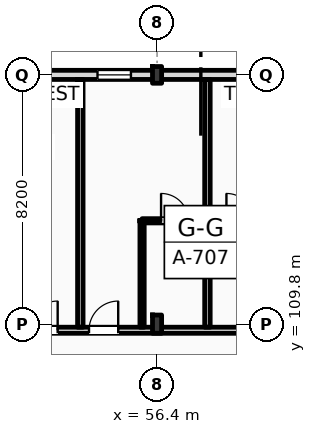
"""IFC4 building model, lengths in metres.
Left out: names, types, materials, properties, quantities, classifications, styles, units other than length and angle.
Written with IfcOpenShell. Run it as: python <this file> out.ifc"""

import sys

from ifc_helpers import new_model, si_unit, direction, frame, frame_2d, origin, origin_2d, place, context, subcontext, project, spatial, rectangle, i_section, extrude, element, fill, save


model = new_model("IFC4")
c1 = context("Model", 3, precision=1e-05, world=origin(), true_north=direction((0.0, 1.0)))
c2 = subcontext(c1, "Body", "Model", "MODEL_VIEW")
j1 = project(units=[si_unit("LENGTHUNIT", "METRE"), si_unit("PLANEANGLEUNIT", "RADIAN")], contexts=[c1])
p1 = place(None, origin())
s1 = spatial("IfcSite", under=j1, at=p1, CompositionType="ELEMENT")
p2 = place(p1, origin())
s2 = spatial("IfcBuilding", under=s1, at=p2, CompositionType="ELEMENT")
p3 = place(p2, frame((0.0, 0.0, 16.2)))
s3 = spatial("IfcBuildingStorey", under=s2, at=p3, CompositionType="ELEMENT", Elevation=16.2)
p4 = place(p3, frame((56.4, 109.8, 0.0), z_axis=(0.0, 0.0, 1.0), x_axis=(1.0, 0.0, 0.0)))
e1 = element("IfcColumn", 1, at=p4, inside=s3, PredefinedType="COLUMN", context=c2, shape_type="SweptSolid", body=[
    extrude(i_section(OverallWidth=0.3, OverallDepth=0.6, WebThickness=0.015, FlangeThickness=0.03, FilletRadius=0.027, at=origin_2d()), origin(), (0.0, 0.0, 1.0), 4.2),
])
p5 = place(p3, frame((56.4, 118.0, 0.0), z_axis=(0.0, 0.0, 1.0), x_axis=(1.0, 0.0, 0.0)))
e2 = element("IfcColumn", 2, at=p5, inside=s3, PredefinedType="COLUMN", context=c2, shape_type="SweptSolid", body=[
    extrude(i_section(OverallWidth=0.3, OverallDepth=0.55, WebThickness=0.015, FlangeThickness=0.029, FilletRadius=0.027, at=origin_2d()), origin(), (0.0, 0.0, 1.0), 4.2),
])
p6 = place(p3, frame((22.5, 118.0, 0.0), z_axis=(0.0, 0.0, 1.0), x_axis=(1.0, 0.0, 0.0)))
e3 = element("IfcWall", 3, at=p6, inside=s3, PredefinedType="STANDARD", context=c2, shape_type="SweptSolid", body=[
    extrude(rectangle(XDim=97.5, YDim=0.3, at=frame_2d((48.75, 0.0))), origin(), (0.0, 0.0, 1.0), 3.36),
])
p7 = place(p6, frame((3.721, 0.0, 0.9)))
e4 = element("IfcOpeningElement", 4, at=p7, cuts=e3, PredefinedType="OPENING", context=c2, shape_type="SweptSolid", body=[
    extrude(rectangle(XDim=0.9, YDim=1.8, at=frame_2d((0.45, 0.9))), frame((0.0, 0.16, 0.0), z_axis=(0.0, -1.0, 0.0), x_axis=(1.0, 0.0, 0.0)), (0.0, 0.0, 1.0), 0.32),
])
p8 = place(p6, frame((6.447, 0.0, 0.9)))
e5 = element("IfcOpeningElement", 5, at=p8, cuts=e3, PredefinedType="OPENING", context=c2, shape_type="SweptSolid", body=[
    extrude(rectangle(XDim=1.35, YDim=1.85, at=frame_2d((0.675, 0.925))), frame((0.0, 0.16, 0.0), z_axis=(0.0, -1.0, 0.0), x_axis=(1.0, 0.0, 0.0)), (0.0, 0.0, 1.0), 0.32),
])
p9 = place(p6, frame((11.363, 0.0, 0.9)))
e6 = element("IfcOpeningElement", 6, at=p9, cuts=e3, PredefinedType="OPENING", context=c2, shape_type="SweptSolid", body=[
    extrude(rectangle(XDim=1.5, YDim=1.9, at=frame_2d((0.75, 0.95))), frame((0.0, 0.16, 0.0), z_axis=(0.0, -1.0, 0.0), x_axis=(1.0, 0.0, 0.0)), (0.0, 0.0, 1.0), 0.32),
])
p10 = place(p6, frame((15.078, 0.0, 0.9)))
e7 = element("IfcOpeningElement", 7, at=p10, cuts=e3, PredefinedType="OPENING", context=c2, shape_type="SweptSolid", body=[
    extrude(rectangle(XDim=1.65, YDim=1.95, at=frame_2d((0.825, 0.975))), frame((0.0, 0.16, 0.0), z_axis=(0.0, -1.0, 0.0), x_axis=(1.0, 0.0, 0.0)), (0.0, 0.0, 1.0), 0.32),
])
p11 = place(p6, frame((19.395, 0.0, 0.9)))
e8 = element("IfcOpeningElement", 8, at=p11, cuts=e3, PredefinedType="OPENING", context=c2, shape_type="SweptSolid", body=[
    extrude(rectangle(XDim=1.8, YDim=2.0, at=frame_2d((0.9, 1.0))), frame((0.0, 0.16, 0.0), z_axis=(0.0, -1.0, 0.0), x_axis=(1.0, 0.0, 0.0)), (0.0, 0.0, 1.0), 0.32),
])
p12 = place(p6, frame((23.31, 0.0, 0.9)))
e9 = element("IfcOpeningElement", 9, at=p12, cuts=e3, PredefinedType="OPENING", context=c2, shape_type="SweptSolid", body=[
    extrude(rectangle(XDim=1.95, YDim=2.05, at=frame_2d((0.975, 1.025))), frame((0.0, 0.16, 0.0), z_axis=(0.0, -1.0, 0.0), x_axis=(1.0, 0.0, 0.0)), (0.0, 0.0, 1.0), 0.32),
])
p13 = place(p6, frame((28.026, 0.0, 0.9)))
e10 = element("IfcOpeningElement", 10, at=p13, cuts=e3, PredefinedType="OPENING", context=c2, shape_type="SweptSolid", body=[
    extrude(rectangle(XDim=2.1, YDim=2.1, at=frame_2d((1.05, 1.05))), frame((0.0, 0.16, 0.0), z_axis=(0.0, -1.0, 0.0), x_axis=(1.0, 0.0, 0.0)), (0.0, 0.0, 1.0), 0.32),
])
p14 = place(p6, frame((31.941, 0.0, 0.9)))
e11 = element("IfcOpeningElement", 11, at=p14, cuts=e3, PredefinedType="OPENING", context=c2, shape_type="SweptSolid", body=[
    extrude(rectangle(XDim=1.1, YDim=2.15, at=frame_2d((0.55, 1.075))), frame((0.0, 0.16, 0.0), z_axis=(0.0, -1.0, 0.0), x_axis=(1.0, 0.0, 0.0)), (0.0, 0.0, 1.0), 0.32),
])
p15 = place(p6, frame((36.657, 0.0, 0.9)))
e12 = element("IfcOpeningElement", 12, at=p15, cuts=e3, PredefinedType="OPENING", context=c2, shape_type="SweptSolid", body=[
    extrude(rectangle(XDim=2.4, YDim=2.2, at=frame_2d((1.2, 1.1))), frame((0.0, 0.16, 0.0), z_axis=(0.0, -1.0, 0.0), x_axis=(1.0, 0.0, 0.0)), (0.0, 0.0, 1.0), 0.32),
])
p16 = place(p6, frame((42.574, 0.0, 0.9)))
e13 = element("IfcOpeningElement", 13, at=p16, cuts=e3, PredefinedType="OPENING", context=c2, shape_type="SweptSolid", body=[
    extrude(rectangle(XDim=1.35, YDim=2.25, at=frame_2d((0.675, 1.125))), frame((0.0, 0.16, 0.0), z_axis=(0.0, -1.0, 0.0), x_axis=(1.0, 0.0, 0.0)), (0.0, 0.0, 1.0), 0.32),
])
p17 = place(p6, frame((45.289, 0.0, 0.9)))
e14 = element("IfcOpeningElement", 14, at=p17, cuts=e3, PredefinedType="OPENING", context=c2, shape_type="SweptSolid", body=[
    extrude(rectangle(XDim=2.7, YDim=2.28, at=frame_2d((1.35, 1.14))), frame((0.0, 0.16, 0.0), z_axis=(0.0, -1.0, 0.0), x_axis=(1.0, 0.0, 0.0)), (0.0, 0.0, 1.0), 0.32),
])
p18 = place(p6, frame((50.406, 0.0, 0.9)))
e15 = element("IfcOpeningElement", 15, at=p18, cuts=e3, PredefinedType="OPENING", context=c2, shape_type="SweptSolid", body=[
    extrude(rectangle(XDim=1.8, YDim=2.28, at=frame_2d((0.9, 1.14))), frame((0.0, 0.16, 0.0), z_axis=(0.0, -1.0, 0.0), x_axis=(1.0, 0.0, 0.0)), (0.0, 0.0, 1.0), 0.32),
])
p19 = place(p6, frame((53.922, 0.0, 0.9)))
e16 = element("IfcOpeningElement", 16, at=p19, cuts=e3, PredefinedType="OPENING", context=c2, shape_type="SweptSolid", body=[
    extrude(rectangle(XDim=1.8, YDim=2.28, at=frame_2d((0.9, 1.14))), frame((0.0, 0.16, 0.0), z_axis=(0.0, -1.0, 0.0), x_axis=(1.0, 0.0, 0.0)), (0.0, 0.0, 1.0), 0.32),
])
p20 = place(p6, frame((58.332, 0.0, 0.9)))
e17 = element("IfcOpeningElement", 17, at=p20, cuts=e3, PredefinedType="OPENING", context=c2, shape_type="SweptSolid", body=[
    extrude(rectangle(XDim=2.961, YDim=2.28, at=frame_2d((1.48, 1.14))), frame((0.0, 0.16, 0.0), z_axis=(0.0, -1.0, 0.0), x_axis=(1.0, 0.0, 0.0)), (0.0, 0.0, 1.0), 0.32),
])
p21 = place(p6, frame((62.513, 0.0, 0.9)))
e18 = element("IfcOpeningElement", 18, at=p21, cuts=e3, PredefinedType="OPENING", context=c2, shape_type="SweptSolid", body=[
    extrude(rectangle(XDim=1.8, YDim=2.28, at=frame_2d((0.9, 1.14))), frame((0.0, 0.16, 0.0), z_axis=(0.0, -1.0, 0.0), x_axis=(1.0, 0.0, 0.0)), (0.0, 0.0, 1.0), 0.32),
])
p22 = place(p6, frame((67.114, 0.0, 0.9)))
e19 = element("IfcOpeningElement", 19, at=p22, cuts=e3, PredefinedType="OPENING", context=c2, shape_type="SweptSolid", body=[
    extrude(rectangle(XDim=2.961, YDim=2.28, at=frame_2d((1.48, 1.14))), frame((0.0, 0.16, 0.0), z_axis=(0.0, -1.0, 0.0), x_axis=(1.0, 0.0, 0.0)), (0.0, 0.0, 1.0), 0.32),
])
p23 = place(p6, frame((73.695, 0.0, 0.9)))
e20 = element("IfcOpeningElement", 20, at=p23, cuts=e3, PredefinedType="OPENING", context=c2, shape_type="SweptSolid", body=[
    extrude(rectangle(XDim=1.1, YDim=2.28, at=frame_2d((0.55, 1.14))), frame((0.0, 0.16, 0.0), z_axis=(0.0, -1.0, 0.0), x_axis=(1.0, 0.0, 0.0)), (0.0, 0.0, 1.0), 0.32),
])
p24 = place(p6, frame((75.895, 0.0, 0.9)))
e21 = element("IfcOpeningElement", 21, at=p24, cuts=e3, PredefinedType="OPENING", context=c2, shape_type="SweptSolid", body=[
    extrude(rectangle(XDim=2.961, YDim=2.28, at=frame_2d((1.48, 1.14))), frame((0.0, 0.16, 0.0), z_axis=(0.0, -1.0, 0.0), x_axis=(1.0, 0.0, 0.0)), (0.0, 0.0, 1.0), 0.32),
])
p25 = place(p6, frame((81.676, 0.0, 0.9)))
e22 = element("IfcOpeningElement", 22, at=p25, cuts=e3, PredefinedType="OPENING", context=c2, shape_type="SweptSolid", body=[
    extrude(rectangle(XDim=1.8, YDim=2.28, at=frame_2d((0.9, 1.14))), frame((0.0, 0.16, 0.0), z_axis=(0.0, -1.0, 0.0), x_axis=(1.0, 0.0, 0.0)), (0.0, 0.0, 1.0), 0.32),
])
p26 = place(p6, frame((84.677, 0.0, 0.9)))
e23 = element("IfcOpeningElement", 23, at=p26, cuts=e3, PredefinedType="OPENING", context=c2, shape_type="SweptSolid", body=[
    extrude(rectangle(XDim=2.961, YDim=2.28, at=frame_2d((1.48, 1.14))), frame((0.0, 0.16, 0.0), z_axis=(0.0, -1.0, 0.0), x_axis=(1.0, 0.0, 0.0)), (0.0, 0.0, 1.0), 0.32),
])
p27 = place(p6, frame((89.999, 0.0, 0.9)))
e24 = element("IfcOpeningElement", 24, at=p27, cuts=e3, PredefinedType="OPENING", context=c2, shape_type="SweptSolid", body=[
    extrude(rectangle(XDim=1.1, YDim=1.5, at=frame_2d((0.55, 0.75))), frame((0.0, 0.16, 0.0), z_axis=(0.0, -1.0, 0.0), x_axis=(1.0, 0.0, 0.0)), (0.0, 0.0, 1.0), 0.32),
])
p28 = place(p6, frame((94.35, 0.0, 0.9)))
e25 = element("IfcOpeningElement", 25, at=p28, cuts=e3, PredefinedType="OPENING", context=c2, shape_type="SweptSolid", body=[
    extrude(rectangle(XDim=1.25, YDim=1.6, at=frame_2d((0.625, 0.8))), frame((0.0, 0.16, 0.0), z_axis=(0.0, -1.0, 0.0), x_axis=(1.0, 0.0, 0.0)), (0.0, 0.0, 1.0), 0.32),
])
p29 = place(p3, frame((10.65, 109.6, 0.0), z_axis=(0.0, 0.0, 1.0), x_axis=(1.0, 0.0, 0.0)))
e26 = element("IfcWall", 26, at=p29, inside=s3, PredefinedType="PARTITIONING", context=c2, shape_type="SweptSolid", body=[
    extrude(rectangle(XDim=109.21, YDim=0.2, at=frame_2d((54.605, 0.0))), origin(), (0.0, 0.0, 1.0), 3.36),
])
p30 = place(p29, frame((15.43, 0.0, 0.0)))
e27 = element("IfcOpeningElement", 27, at=p30, cuts=e26, PredefinedType="OPENING", context=c2, shape_type="SweptSolid", body=[
    extrude(rectangle(XDim=1.02, YDim=2.2, at=frame_2d((0.51, 1.1))), frame((0.0, 0.11, 0.0), z_axis=(0.0, -1.0, 0.0), x_axis=(1.0, 0.0, 0.0)), (0.0, 0.0, 1.0), 0.22),
])
p31 = place(p29, frame((19.537, 0.0, 0.0)))
e28 = element("IfcOpeningElement", 28, at=p31, cuts=e26, PredefinedType="OPENING", context=c2, shape_type="SweptSolid", body=[
    extrude(rectangle(XDim=1.02, YDim=2.2, at=frame_2d((0.51, 1.1))), frame((0.0, 0.11, 0.0), z_axis=(0.0, -1.0, 0.0), x_axis=(1.0, 0.0, 0.0)), (0.0, 0.0, 1.0), 0.22),
])
p32 = place(p29, frame((23.928, 0.0, 0.0)))
e29 = element("IfcOpeningElement", 29, at=p32, cuts=e26, PredefinedType="OPENING", context=c2, shape_type="SweptSolid", body=[
    extrude(rectangle(XDim=1.02, YDim=2.2, at=frame_2d((0.51, 1.1))), frame((0.0, 0.11, 0.0), z_axis=(0.0, -1.0, 0.0), x_axis=(1.0, 0.0, 0.0)), (0.0, 0.0, 1.0), 0.22),
])
p33 = place(p29, frame((26.169, 0.0, 0.0)))
e30 = element("IfcOpeningElement", 30, at=p33, cuts=e26, PredefinedType="OPENING", context=c2, shape_type="SweptSolid", body=[
    extrude(rectangle(XDim=1.02, YDim=2.2, at=frame_2d((0.51, 1.1))), frame((0.0, 0.11, 0.0), z_axis=(0.0, -1.0, 0.0), x_axis=(1.0, 0.0, 0.0)), (0.0, 0.0, 1.0), 0.22),
])
p34 = place(p29, frame((32.739, 0.0, 0.0)))
e31 = element("IfcOpeningElement", 31, at=p34, cuts=e26, PredefinedType="OPENING", context=c2, shape_type="SweptSolid", body=[
    extrude(rectangle(XDim=0.96, YDim=2.2, at=frame_2d((0.48, 1.1))), frame((0.0, 0.11, 0.0), z_axis=(0.0, -1.0, 0.0), x_axis=(1.0, 0.0, 0.0)), (0.0, 0.0, 1.0), 0.22),
])
p35 = place(p29, frame((34.98, 0.0, 0.0)))
e32 = element("IfcOpeningElement", 32, at=p35, cuts=e26, PredefinedType="OPENING", context=c2, shape_type="SweptSolid", body=[
    extrude(rectangle(XDim=0.96, YDim=2.2, at=frame_2d((0.48, 1.1))), frame((0.0, 0.11, 0.0), z_axis=(0.0, -1.0, 0.0), x_axis=(1.0, 0.0, 0.0)), (0.0, 0.0, 1.0), 0.22),
])
p36 = place(p29, frame((41.521, 0.0, 0.0)))
e33 = element("IfcOpeningElement", 33, at=p36, cuts=e26, PredefinedType="OPENING", context=c2, shape_type="SweptSolid", body=[
    extrude(rectangle(XDim=0.96, YDim=2.2, at=frame_2d((0.48, 1.1))), frame((0.0, 0.11, 0.0), z_axis=(0.0, -1.0, 0.0), x_axis=(1.0, 0.0, 0.0)), (0.0, 0.0, 1.0), 0.22),
])
p37 = place(p29, frame((43.512, 0.0, 0.0)))
e34 = element("IfcOpeningElement", 34, at=p37, cuts=e26, PredefinedType="OPENING", context=c2, shape_type="SweptSolid", body=[
    extrude(rectangle(XDim=0.96, YDim=2.2, at=frame_2d((0.48, 1.1))), frame((0.0, 0.11, 0.0), z_axis=(0.0, -1.0, 0.0), x_axis=(1.0, 0.0, 0.0)), (0.0, 0.0, 1.0), 0.22),
])
p38 = place(p29, frame((50.303, 0.0, 0.0)))
e35 = element("IfcOpeningElement", 35, at=p38, cuts=e26, PredefinedType="OPENING", context=c2, shape_type="SweptSolid", body=[
    extrude(rectangle(XDim=0.96, YDim=2.2, at=frame_2d((0.48, 1.1))), frame((0.0, 0.11, 0.0), z_axis=(0.0, -1.0, 0.0), x_axis=(1.0, 0.0, 0.0)), (0.0, 0.0, 1.0), 0.22),
])
p39 = place(p29, frame((54.944, 0.0, 0.0)))
e36 = element("IfcOpeningElement", 36, at=p39, cuts=e26, PredefinedType="OPENING", context=c2, shape_type="SweptSolid", body=[
    extrude(rectangle(XDim=0.96, YDim=2.2, at=frame_2d((0.48, 1.1))), frame((0.0, 0.11, 0.0), z_axis=(0.0, -1.0, 0.0), x_axis=(1.0, 0.0, 0.0)), (0.0, 0.0, 1.0), 0.22),
])
p40 = place(p29, frame((59.085, 0.0, 0.0)))
e37 = element("IfcOpeningElement", 37, at=p40, cuts=e26, PredefinedType="OPENING", context=c2, shape_type="SweptSolid", body=[
    extrude(rectangle(XDim=0.96, YDim=2.2, at=frame_2d((0.48, 1.1))), frame((0.0, 0.11, 0.0), z_axis=(0.0, -1.0, 0.0), x_axis=(1.0, 0.0, 0.0)), (0.0, 0.0, 1.0), 0.22),
])
p41 = place(p29, frame((63.476, 0.0, 0.0)))
e38 = element("IfcOpeningElement", 38, at=p41, cuts=e26, PredefinedType="OPENING", context=c2, shape_type="SweptSolid", body=[
    extrude(rectangle(XDim=0.96, YDim=2.2, at=frame_2d((0.48, 1.1))), frame((0.0, 0.11, 0.0), z_axis=(0.0, -1.0, 0.0), x_axis=(1.0, 0.0, 0.0)), (0.0, 0.0, 1.0), 0.22),
])
p42 = place(p29, frame((65.716, 0.0, 0.0)))
e39 = element("IfcOpeningElement", 39, at=p42, cuts=e26, PredefinedType="OPENING", context=c2, shape_type="SweptSolid", body=[
    extrude(rectangle(XDim=0.96, YDim=2.2, at=frame_2d((0.48, 1.1))), frame((0.0, 0.11, 0.0), z_axis=(0.0, -1.0, 0.0), x_axis=(1.0, 0.0, 0.0)), (0.0, 0.0, 1.0), 0.22),
])
p43 = place(p29, frame((72.257, 0.0, 0.0)))
e40 = element("IfcOpeningElement", 40, at=p43, cuts=e26, PredefinedType="OPENING", context=c2, shape_type="SweptSolid", body=[
    extrude(rectangle(XDim=0.96, YDim=2.2, at=frame_2d((0.48, 1.1))), frame((0.0, 0.11, 0.0), z_axis=(0.0, -1.0, 0.0), x_axis=(1.0, 0.0, 0.0)), (0.0, 0.0, 1.0), 0.22),
])
p44 = place(p29, frame((74.498, 0.0, 0.0)))
e41 = element("IfcOpeningElement", 41, at=p44, cuts=e26, PredefinedType="OPENING", context=c2, shape_type="SweptSolid", body=[
    extrude(rectangle(XDim=0.96, YDim=2.2, at=frame_2d((0.48, 1.1))), frame((0.0, 0.11, 0.0), z_axis=(0.0, -1.0, 0.0), x_axis=(1.0, 0.0, 0.0)), (0.0, 0.0, 1.0), 0.22),
])
p45 = place(p29, frame((81.039, 0.0, 0.0)))
e42 = element("IfcOpeningElement", 42, at=p45, cuts=e26, PredefinedType="OPENING", context=c2, shape_type="SweptSolid", body=[
    extrude(rectangle(XDim=0.96, YDim=2.2, at=frame_2d((0.48, 1.1))), frame((0.0, 0.11, 0.0), z_axis=(0.0, -1.0, 0.0), x_axis=(1.0, 0.0, 0.0)), (0.0, 0.0, 1.0), 0.22),
])
p46 = place(p29, frame((85.68, 0.0, 0.0)))
e43 = element("IfcOpeningElement", 43, at=p46, cuts=e26, PredefinedType="OPENING", context=c2, shape_type="SweptSolid", body=[
    extrude(rectangle(XDim=0.96, YDim=2.2, at=frame_2d((0.48, 1.1))), frame((0.0, 0.11, 0.0), z_axis=(0.0, -1.0, 0.0), x_axis=(1.0, 0.0, 0.0)), (0.0, 0.0, 1.0), 0.22),
])
p47 = place(p29, frame((89.82, 0.0, 0.0)))
e44 = element("IfcOpeningElement", 44, at=p47, cuts=e26, PredefinedType="OPENING", context=c2, shape_type="SweptSolid", body=[
    extrude(rectangle(XDim=0.96, YDim=2.2, at=frame_2d((0.48, 1.1))), frame((0.0, 0.11, 0.0), z_axis=(0.0, -1.0, 0.0), x_axis=(1.0, 0.0, 0.0)), (0.0, 0.0, 1.0), 0.22),
])
p48 = place(p29, frame((94.211, 0.0, 0.0)))
e45 = element("IfcOpeningElement", 45, at=p48, cuts=e26, PredefinedType="OPENING", context=c2, shape_type="SweptSolid", body=[
    extrude(rectangle(XDim=0.96, YDim=2.2, at=frame_2d((0.48, 1.1))), frame((0.0, 0.11, 0.0), z_axis=(0.0, -1.0, 0.0), x_axis=(1.0, 0.0, 0.0)), (0.0, 0.0, 1.0), 0.22),
])
p49 = place(p29, frame((98.602, 0.0, 0.0)))
e46 = element("IfcOpeningElement", 46, at=p49, cuts=e26, PredefinedType="OPENING", context=c2, shape_type="SweptSolid", body=[
    extrude(rectangle(XDim=0.96, YDim=2.2, at=frame_2d((0.48, 1.1))), frame((0.0, 0.11, 0.0), z_axis=(0.0, -1.0, 0.0), x_axis=(1.0, 0.0, 0.0)), (0.0, 0.0, 1.0), 0.22),
])
p50 = place(p29, frame((102.993, 0.0, 0.0)))
e47 = element("IfcOpeningElement", 47, at=p50, cuts=e26, PredefinedType="OPENING", context=c2, shape_type="SweptSolid", body=[
    extrude(rectangle(XDim=0.96, YDim=2.2, at=frame_2d((0.48, 1.1))), frame((0.0, 0.11, 0.0), z_axis=(0.0, -1.0, 0.0), x_axis=(1.0, 0.0, 0.0)), (0.0, 0.0, 1.0), 0.22),
])
p51 = place(p29, frame((105.269, 0.0, 0.0)))
e48 = element("IfcOpeningElement", 48, at=p51, cuts=e26, PredefinedType="OPENING", context=c2, shape_type="SweptSolid", body=[
    extrude(rectangle(XDim=0.96, YDim=2.2, at=frame_2d((0.48, 1.1))), frame((0.0, 0.11, 0.0), z_axis=(0.0, -1.0, 0.0), x_axis=(1.0, 0.0, 0.0)), (0.0, 0.0, 1.0), 0.22),
])
p52 = place(p29, frame((2.716, 0.0, 0.0)))
e49 = element("IfcOpeningElement", 49, at=p52, cuts=e26, PredefinedType="OPENING", context=c2, shape_type="SweptSolid", body=[
    extrude(rectangle(XDim=1.35, YDim=2.25, at=frame_2d((0.675, 1.125))), frame((0.0, 0.11, 0.0), z_axis=(0.0, -1.0, 0.0), x_axis=(1.0, 0.0, 0.0)), (0.0, 0.0, 1.0), 0.22),
])
p53 = place(p29, frame((6.65, 0.0, 0.0)))
e50 = element("IfcOpeningElement", 50, at=p53, cuts=e26, PredefinedType="OPENING", context=c2, shape_type="SweptSolid", body=[
    extrude(rectangle(XDim=1.35, YDim=2.25, at=frame_2d((0.675, 1.125))), frame((0.0, 0.11, 0.0), z_axis=(0.0, -1.0, 0.0), x_axis=(1.0, 0.0, 0.0)), (0.0, 0.0, 1.0), 0.22),
])
p54 = place(p29, frame((10.583, 0.0, 0.0)))
e51 = element("IfcOpeningElement", 51, at=p54, cuts=e26, PredefinedType="OPENING", context=c2, shape_type="SweptSolid", body=[
    extrude(rectangle(XDim=1.35, YDim=2.25, at=frame_2d((0.675, 1.125))), frame((0.0, 0.11, 0.0), z_axis=(0.0, -1.0, 0.0), x_axis=(1.0, 0.0, 0.0)), (0.0, 0.0, 1.0), 0.22),
])
p55 = place(p3, frame((53.876, 109.7, 0.0), z_axis=(0.0, 0.0, 1.0), x_axis=(0.0, 1.0, 0.0)))
e52 = element("IfcWall", 52, at=p55, inside=s3, PredefinedType="PARTITIONING", context=c2, shape_type="SweptSolid", body=[
    extrude(rectangle(XDim=8.15, YDim=0.18, at=frame_2d((4.075, 0.0))), origin(), (0.0, 0.0, 1.0), 3.61),
])
p56 = place(p3, frame((58.057, 109.7, 0.0), z_axis=(0.0, 0.0, 1.0), x_axis=(0.0, 1.0, 0.0)))
e53 = element("IfcWall", 53, at=p56, inside=s3, PredefinedType="PARTITIONING", context=c2, shape_type="SweptSolid", body=[
    extrude(rectangle(XDim=8.15, YDim=0.18, at=frame_2d((4.075, 0.0))), origin(), (0.0, 0.0, 1.0), 3.92),
])
p57 = place(p3, frame((55.907, 109.7, 0.0), z_axis=(0.0, 0.0, 1.0), x_axis=(0.0, 1.0, 0.0)))
e54 = element("IfcWall", 54, at=p57, inside=s3, PredefinedType="PARTITIONING", context=c2, shape_type="SweptSolid", body=[
    extrude(rectangle(XDim=3.5, YDim=0.14, at=frame_2d((1.75, 0.0))), origin(), (0.0, 0.0, 1.0), 3.92),
])
p58 = place(p3, frame((55.907, 113.2, 0.0), z_axis=(0.0, 0.0, 1.0), x_axis=(1.0, 0.0, 0.0)))
e55 = element("IfcWall", 55, at=p58, inside=s3, PredefinedType="PARTITIONING", context=c2, shape_type="SweptSolid", body=[
    extrude(rectangle(XDim=2.15, YDim=0.14, at=frame_2d((1.075, 0.0))), origin(), (0.0, 0.0, 1.0), 3.92),
])
p59 = place(p58, frame((0.625, 0.0, 0.0)))
e56 = element("IfcOpeningElement", 56, at=p59, cuts=e55, PredefinedType="OPENING", context=c2, shape_type="SweptSolid", body=[
    extrude(rectangle(XDim=0.9, YDim=2.1, at=frame_2d((0.45, 1.05))), frame((0.0, 0.08, 0.0), z_axis=(0.0, -1.0, 0.0), x_axis=(1.0, 0.0, 0.0)), (0.0, 0.0, 1.0), 0.16),
])
p60 = place(p3, frame((58.057, 113.2, 0.0), z_axis=(0.0, 0.0, 1.0), x_axis=(1.0, 0.0, 0.0)))
e57 = element("IfcWall", 57, at=p60, inside=s3, PredefinedType="PARTITIONING", context=c2, shape_type="SweptSolid", body=[
    extrude(rectangle(XDim=2.15, YDim=0.14, at=frame_2d((1.075, 0.0))), origin(), (0.0, 0.0, 1.0), 3.92),
])
p61 = place(p60, frame((0.625, 0.0, 0.0)))
e58 = element("IfcOpeningElement", 58, at=p61, cuts=e57, PredefinedType="OPENING", context=c2, shape_type="SweptSolid", body=[
    extrude(rectangle(XDim=0.9, YDim=2.1, at=frame_2d((0.45, 1.05))), frame((0.0, 0.08, 0.0), z_axis=(0.0, -1.0, 0.0), x_axis=(1.0, 0.0, 0.0)), (0.0, 0.0, 1.0), 0.16),
])
p62 = place(p14, origin())
e59 = element("IfcWindow", 59, at=p62, inside=s3, PartitioningType="DOUBLE_PANEL_VERTICAL", PredefinedType="WINDOW", context=c2, shape_type="SweptSolid", body=[
    extrude(rectangle(XDim=1.1, YDim=2.15, at=frame_2d((0.55, 1.075))), frame((0.0, 0.03, 0.0), z_axis=(0.0, -1.0, 0.0), x_axis=(1.0, 0.0, 0.0)), (0.0, 0.0, 1.0), 0.06),
])
fill(e11, e59)
p63 = place(p36, origin())
e60 = element("IfcDoor", 60, at=p63, inside=s3, OperationType="SINGLE_SWING_RIGHT", PredefinedType="DOOR", context=c2, shape_type="SweptSolid", body=[
    extrude(rectangle(XDim=0.96, YDim=2.2, at=frame_2d((0.48, 1.1))), frame((0.0, 0.025, 0.0), z_axis=(0.0, -1.0, 0.0), x_axis=(1.0, 0.0, 0.0)), (0.0, 0.0, 1.0), 0.05),
])
fill(e33, e60)
p64 = place(p37, origin())
e61 = element("IfcDoor", 61, at=p64, inside=s3, OperationType="SINGLE_SWING_RIGHT", PredefinedType="DOOR", context=c2, shape_type="SweptSolid", body=[
    extrude(rectangle(XDim=0.96, YDim=2.2, at=frame_2d((0.48, 1.1))), frame((0.0, 0.025, 0.0), z_axis=(0.0, -1.0, 0.0), x_axis=(1.0, 0.0, 0.0)), (0.0, 0.0, 1.0), 0.05),
])
fill(e34, e61)
p65 = place(p59, origin())
e62 = element("IfcDoor", 62, at=p65, inside=s3, OperationType="SINGLE_SWING_LEFT", PredefinedType="DOOR", context=c2, shape_type="SweptSolid", body=[
    extrude(rectangle(XDim=0.9, YDim=2.1, at=frame_2d((0.45, 1.05))), frame((0.0, 0.025, 0.0), z_axis=(0.0, -1.0, 0.0), x_axis=(1.0, 0.0, 0.0)), (0.0, 0.0, 1.0), 0.05),
])
fill(e56, e62)
p66 = place(p61, origin())
e63 = element("IfcDoor", 63, at=p66, inside=s3, OperationType="SINGLE_SWING_LEFT", PredefinedType="DOOR", context=c2, shape_type="SweptSolid", body=[
    extrude(rectangle(XDim=0.9, YDim=2.1, at=frame_2d((0.45, 1.05))), frame((0.0, 0.025, 0.0), z_axis=(0.0, -1.0, 0.0), x_axis=(1.0, 0.0, 0.0)), (0.0, 0.0, 1.0), 0.05),
])
fill(e58, e63)
save(model, sys.argv[1])
